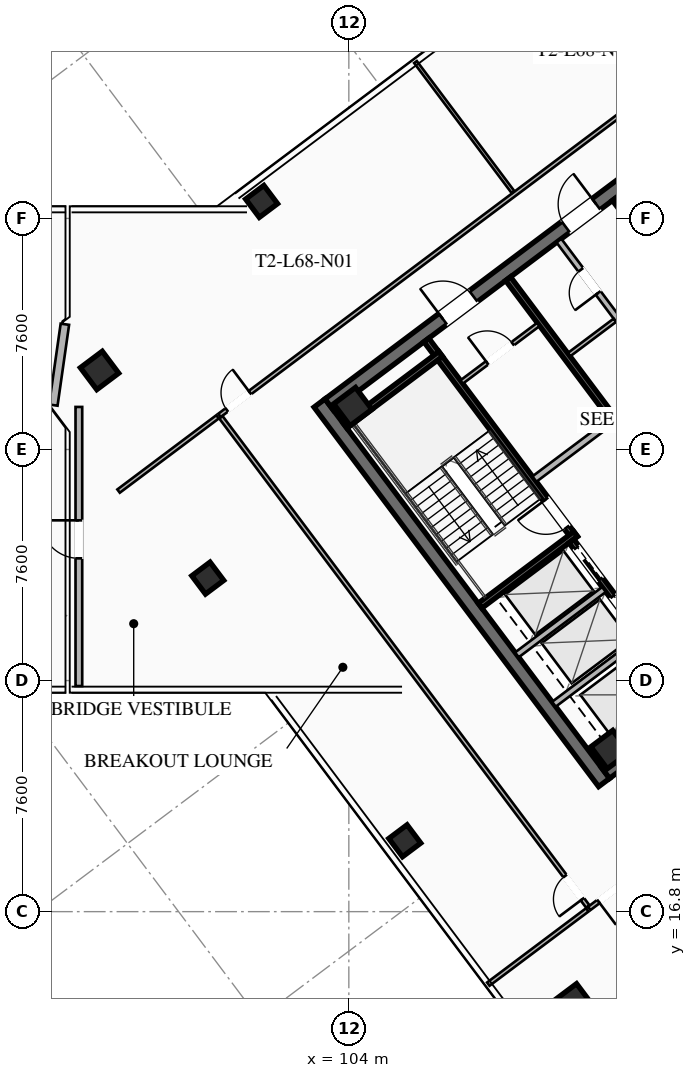
"""IFC4 building model, lengths in metres.
Left out: names, types, materials, properties, quantities, classifications, styles, units other than length and angle.
Written with IfcOpenShell. Run it as: python <this file> out.ifc"""

import sys

from ifc_helpers import new_model, si_unit, direction, frame, frame_2d, origin, origin_2d, place, context, subcontext, project, spatial, rectangle, hollow_rectangle, extrude, element, fill, save


model = new_model("IFC4")
c1 = context("Model", 3, precision=1e-05, world=origin(), true_north=direction((0.0, 1.0)))
c2 = subcontext(c1, "Body", "Model", "MODEL_VIEW")
j1 = project(units=[si_unit("LENGTHUNIT", "METRE"), si_unit("PLANEANGLEUNIT", "RADIAN")], contexts=[c1])
p1 = place(None, origin())
s1 = spatial("IfcSite", under=j1, at=p1, CompositionType="ELEMENT")
p2 = place(p1, origin())
s2 = spatial("IfcBuilding", under=s1, at=p2, CompositionType="ELEMENT")
p3 = place(p2, frame((0.0, 0.0, 251.4)))
s3 = spatial("IfcBuildingStorey", under=s2, at=p3, CompositionType="ELEMENT", Elevation=251.4)
p4 = place(p3, frame((112.396, 21.047, 0.0), z_axis=(0.0, 0.0, 1.0), x_axis=(-0.600005007985, 0.799996243986, 0.0)))
e1 = element("IfcWall", 1, at=p4, inside=s3, PredefinedType="SHEAR", context=c2, shape_type="SweptSolid", body=[
    extrude(rectangle(XDim=15.6, YDim=0.45, at=frame_2d((7.8, 0.0))), origin(), (0.0, 0.0, 1.0), 4.0),
])
p5 = place(p3, frame((124.649, 30.518, 0.0), z_axis=(0.0, 0.0, 1.0), x_axis=(-0.8, -0.6, 0.0)))
e2 = element("IfcWall", 2, at=p5, inside=s3, PredefinedType="SHEAR", context=c2, shape_type="SweptSolid", body=[
    extrude(rectangle(XDim=15.26, YDim=0.45, at=frame_2d((7.63, 0.0))), origin(), (0.0, 0.0, 1.0), 4.0),
])
p6 = place(p5, frame((9.33, 0.0, 0.0)))
e3 = element("IfcOpeningElement", 3, at=p6, cuts=e2, PredefinedType="OPENING", context=c2, shape_type="SweptSolid", body=[
    extrude(rectangle(XDim=1.25, YDim=2.25, at=frame_2d((0.625, 1.125))), frame((0.0, 0.235, 0.0), z_axis=(0.0, -1.0, 0.0), x_axis=(1.0, 0.0, 0.0)), (0.0, 0.0, 1.0), 0.47),
])
p7 = place(p5, frame((4.28, 0.0, 0.0)))
e4 = element("IfcOpeningElement", 4, at=p7, cuts=e2, PredefinedType="OPENING", context=c2, shape_type="SweptSolid", body=[
    extrude(rectangle(XDim=1.25, YDim=2.25, at=frame_2d((0.625, 1.125))), frame((0.0, 0.235, 0.0), z_axis=(0.0, -1.0, 0.0), x_axis=(1.0, 0.0, 0.0)), (0.0, 0.0, 1.0), 0.47),
])
p8 = place(p3, frame((103.351, 33.482, 0.0), z_axis=(0.0, 0.0, 1.0), x_axis=(0.8, 0.6, 0.0)))
e5 = element("IfcWall", 5, at=p8, inside=s3, PredefinedType="SHEAR", context=c2, shape_type="SweptSolid", body=[
    extrude(rectangle(XDim=15.26, YDim=0.45, at=frame_2d((7.63, 0.0))), origin(), (0.0, 0.0, 1.0), 4.0),
])
p9 = place(p8, frame((4.68, 0.0, 0.0)))
e6 = element("IfcOpeningElement", 6, at=p9, cuts=e5, PredefinedType="OPENING", context=c2, shape_type="SweptSolid", body=[
    extrude(rectangle(XDim=1.25, YDim=2.25, at=frame_2d((0.625, 1.125))), frame((0.0, 0.235, 0.0), z_axis=(0.0, -1.0, 0.0), x_axis=(1.0, 0.0, 0.0)), (0.0, 0.0, 1.0), 0.47),
])
p10 = place(p8, frame((9.73, 0.0, 0.0)))
e7 = element("IfcOpeningElement", 7, at=p10, cuts=e5, PredefinedType="OPENING", context=c2, shape_type="SweptSolid", body=[
    extrude(rectangle(XDim=1.25, YDim=2.25, at=frame_2d((0.625, 1.125))), frame((0.0, 0.235, 0.0), z_axis=(0.0, -1.0, 0.0), x_axis=(1.0, 0.0, 0.0)), (0.0, 0.0, 1.0), 0.47),
])
for number, where, z_axis, x_axis in (
    (8, (112.59, 22.13, 0.0), (0.0, 0.0, 1.0), (0.8, 0.6, 0.0)),
    (9, (104.13, 33.41, 0.0), (0.0, 0.0, 1.0), (0.8, 0.6, 0.0)),
    (10, (111.4, 13.8, 0.0), (0.0, 0.0, 1.0), (0.8, 0.6, 0.0)),
    (11, (95.8, 34.6, 0.0), (0.0, 0.0, 1.0), (0.8, 0.6, 0.0)),
):
    element("IfcColumn", number, at=place(p3, frame(where, z_axis=z_axis, x_axis=x_axis)), inside=s3, PredefinedType="COLUMN", context=c2, shape_type="SweptSolid", body=[
        extrude(hollow_rectangle(XDim=0.9, YDim=0.9, WallThickness=0.04, at=origin_2d()), origin(), (0.0, 0.0, 1.0), 3.78),
    ])
for number, where, z_axis, x_axis in (
    (12, (101.13, 40.16, 0.0), (0.0, 0.0, 1.0), (0.8, 0.6, 0.0)),
    (13, (99.36, 27.77, 0.0), (0.0, 0.0, 1.0), (0.8, 0.6, 0.0)),
    (14, (105.84, 19.13, 0.0), (0.0, 0.0, 1.0), (0.8, 0.6, 0.0)),
):
    element("IfcColumn", number, at=place(p3, frame(where, z_axis=z_axis, x_axis=x_axis)), inside=s3, PredefinedType="COLUMN", context=c2, shape_type="SweptSolid", body=[
        extrude(hollow_rectangle(XDim=0.75, YDim=0.75, WallThickness=0.032, at=origin_2d()), origin(), (0.0, 0.0, 1.0), 3.78),
    ])
p11 = place(p3, frame((94.28, 33.46, 0.0), z_axis=(0.0, 0.0, 1.0), x_axis=(0.141370477216, 0.989956760759, 0.0)))
e15 = element("IfcWall", 15, at=p11, inside=s3, PredefinedType="SOLIDWALL", context=c2, shape_type="SweptSolid", body=[
    extrude(rectangle(XDim=2.687, YDim=0.28, at=frame_2d((1.344, 0.0))), origin(), (0.0, 0.0, 1.0), 2.96),
])
p12 = place(p3, frame((95.12, 24.22, 0.0), z_axis=(0.0, 0.0, 1.0), x_axis=(0.0, 1.0, 0.0)))
e16 = element("IfcWall", 16, at=p12, inside=s3, PredefinedType="SOLIDWALL", context=c2, shape_type="SweptSolid", body=[
    extrude(rectangle(XDim=9.18, YDim=0.22, at=frame_2d((4.59, 0.0))), origin(), (0.0, 0.0, 1.0), 2.971),
])
p13 = place(p12, frame((4.2, 0.0, 0.0)))
e17 = element("IfcOpeningElement", 17, at=p13, cuts=e16, PredefinedType="OPENING", context=c2, shape_type="SweptSolid", body=[
    extrude(rectangle(XDim=1.25, YDim=2.25, at=frame_2d((0.625, 1.125))), frame((0.0, 0.12, 0.0), z_axis=(0.0, -1.0, 0.0), x_axis=(1.0, 0.0, 0.0)), (0.0, 0.0, 1.0), 0.24),
])
p14 = place(p3, frame((111.44, 29.08, 0.0), z_axis=(0.0, 0.0, 1.0), x_axis=(-0.59999041401, 0.800007189403, 0.0)))
e18 = element("IfcWall", 18, at=p14, inside=s3, PredefinedType="SHEAR", context=c2, shape_type="SweptSolid", body=[
    extrude(rectangle(XDim=8.15, YDim=0.2, at=frame_2d((4.075, 0.0))), origin(), (0.0, 0.0, 1.0), 3.78),
])
p15 = place(p14, frame((0.45, 0.0, 0.0)))
e19 = element("IfcOpeningElement", 19, at=p15, cuts=e18, PredefinedType="OPENING", context=c2, shape_type="SweptSolid", body=[
    extrude(rectangle(XDim=1.15, YDim=2.2, at=frame_2d((0.575, 1.1))), frame((0.0, 0.11, 0.0), z_axis=(0.0, -1.0, 0.0), x_axis=(1.0, 0.0, 0.0)), (0.0, 0.0, 1.0), 0.22),
])
for number, where, z_axis, x_axis in (
    (20, (108.316, 26.862, 0.0), (0.0, 0.0, 1.0), (0.8, 0.6, 0.0)),
    (21, (103.876, 32.782, 0.0), (0.0, 0.0, 1.0), (0.8, 0.6, 0.0)),
):
    element("IfcWall", number, at=place(p3, frame(where, z_axis=z_axis, x_axis=x_axis)), inside=s3, PredefinedType="SHEAR", context=c2, shape_type="SweptSolid", body=[
        extrude(rectangle(XDim=3.93, YDim=0.2, at=frame_2d((1.965, 0.0))), origin(), (0.0, 0.0, 1.0), 3.78),
    ])
p16 = place(p3, frame((118.058, 25.856, 0.0), z_axis=(0.0, 0.0, 1.0), x_axis=(-0.600002657301, 0.799998007018, 0.0)))
e22 = element("IfcWall", 22, at=p16, inside=s3, PredefinedType="SHEAR", context=c2, shape_type="SweptSolid", body=[
    extrude(rectangle(XDim=14.7, YDim=0.2, at=frame_2d((7.35, 0.0))), origin(), (0.0, 0.0, 1.0), 3.78),
])
p17 = place(p3, frame((110.104, 31.028, 0.0), z_axis=(0.0, 0.0, 1.0), x_axis=(0.800018601094, 0.59997519774, 0.0)))
e23 = element("IfcWall", 23, at=p17, inside=s3, PredefinedType="SOLIDWALL", context=c2, shape_type="SweptSolid", body=[
    extrude(rectangle(XDim=3.15, YDim=0.22, at=frame_2d((1.575, 0.0))), origin(), (0.0, 0.0, 1.0), 2.971),
])
p18 = place(p3, frame((115.25, 23.75, 0.0), z_axis=(0.0, 0.0, 1.0), x_axis=(-0.599994036198, 0.800004472816, 0.0)))
e24 = element("IfcWall", 24, at=p18, inside=s3, PredefinedType="SHEAR", context=c2, shape_type="SweptSolid", body=[
    extrude(rectangle(XDim=6.55, YDim=0.2, at=frame_2d((3.275, 0.0))), origin(), (0.0, 0.0, 1.0), 3.78),
])
p19 = place(p18, frame((4.975, 0.0, 0.0)))
e25 = element("IfcOpeningElement", 25, at=p19, cuts=e24, PredefinedType="OPENING", context=c2, shape_type="SweptSolid", body=[
    extrude(rectangle(XDim=1.3, YDim=2.25, at=frame_2d((0.65, 1.125))), frame((0.0, 0.11, 0.0), z_axis=(0.0, -1.0, 0.0), x_axis=(1.0, 0.0, 0.0)), (0.0, 0.0, 1.0), 0.22),
])
p20 = place(p18, frame((2.975, 0.0, 0.0)))
e26 = element("IfcOpeningElement", 26, at=p20, cuts=e24, PredefinedType="OPENING", context=c2, shape_type="SweptSolid", body=[
    extrude(rectangle(XDim=1.3, YDim=2.25, at=frame_2d((0.65, 1.125))), frame((0.0, 0.11, 0.0), z_axis=(0.0, -1.0, 0.0), x_axis=(1.0, 0.0, 0.0)), (0.0, 0.0, 1.0), 0.22),
])
p21 = place(p18, frame((0.775, 0.0, 0.0)))
e27 = element("IfcOpeningElement", 27, at=p21, cuts=e24, PredefinedType="OPENING", context=c2, shape_type="SweptSolid", body=[
    extrude(rectangle(XDim=1.3, YDim=2.25, at=frame_2d((0.65, 1.125))), frame((0.0, 0.11, 0.0), z_axis=(0.0, -1.0, 0.0), x_axis=(1.0, 0.0, 0.0)), (0.0, 0.0, 1.0), 0.22),
])
for number, where, z_axis, x_axis in (
    (28, (110.746, 23.622, 0.0), (0.0, 0.0, 1.0), (0.8, 0.6, 0.0)),
    (29, (109.528, 25.246, 0.0), (0.0, 0.0, 1.0), (0.8, 0.6, 0.0)),
):
    element("IfcWall", number, at=place(p3, frame(where, z_axis=z_axis, x_axis=x_axis)), inside=s3, PredefinedType="SOLIDWALL", context=c2, shape_type="SweptSolid", body=[
        extrude(rectangle(XDim=3.58, YDim=0.2, at=frame_2d((1.79, 0.0))), origin(), (0.0, 0.0, 1.0), 3.78),
    ])
p22 = place(p3, frame((112.75, 40.25, 0.0), z_axis=(0.0, 0.0, 1.0), x_axis=(0.599994036198, -0.800004472816, 0.0)))
e30 = element("IfcWall", 30, at=p22, inside=s3, PredefinedType="SHEAR", context=c2, shape_type="SweptSolid", body=[
    extrude(rectangle(XDim=6.55, YDim=0.2, at=frame_2d((3.275, 0.0))), origin(), (0.0, 0.0, 1.0), 3.78),
])
p23 = place(p22, frame((5.075, 0.0, 0.0)))
e31 = element("IfcOpeningElement", 31, at=p23, cuts=e30, PredefinedType="OPENING", context=c2, shape_type="SweptSolid", body=[
    extrude(rectangle(XDim=1.1, YDim=2.2, at=frame_2d((0.55, 1.1))), frame((0.0, 0.11, 0.0), z_axis=(0.0, -1.0, 0.0), x_axis=(1.0, 0.0, 0.0)), (0.0, 0.0, 1.0), 0.22),
])
p24 = place(p22, frame((3.025, 0.0, 0.0)))
e32 = element("IfcOpeningElement", 32, at=p24, cuts=e30, PredefinedType="OPENING", context=c2, shape_type="SweptSolid", body=[
    extrude(rectangle(XDim=1.1, YDim=2.2, at=frame_2d((0.55, 1.1))), frame((0.0, 0.11, 0.0), z_axis=(0.0, -1.0, 0.0), x_axis=(1.0, 0.0, 0.0)), (0.0, 0.0, 1.0), 0.22),
])
p25 = place(p22, frame((1.025, 0.0, 0.0)))
e33 = element("IfcOpeningElement", 33, at=p25, cuts=e30, PredefinedType="OPENING", context=c2, shape_type="SweptSolid", body=[
    extrude(rectangle(XDim=1.1, YDim=2.2, at=frame_2d((0.55, 1.1))), frame((0.0, 0.11, 0.0), z_axis=(0.0, -1.0, 0.0), x_axis=(1.0, 0.0, 0.0)), (0.0, 0.0, 1.0), 0.22),
])
p26 = place(p3, frame((107.71, 34.22, 0.0), z_axis=(0.0, 0.0, 1.0), x_axis=(0.799981399002, 0.60002480053, 0.0)))
e34 = element("IfcWall", 34, at=p26, inside=s3, PredefinedType="PARTITIONING", context=c2, shape_type="SweptSolid", body=[
    extrude(rectangle(XDim=3.15, YDim=0.135, at=frame_2d((1.575, 0.0))), origin(), (0.0, 0.0, 1.0), 2.971),
])
p27 = place(p26, frame((1.05, 0.0, 0.0)))
e35 = element("IfcOpeningElement", 35, at=p27, cuts=e34, PredefinedType="OPENING", context=c2, shape_type="SweptSolid", body=[
    extrude(rectangle(XDim=1.05, YDim=2.2, at=frame_2d((0.525, 1.1))), frame((0.0, 0.077, 0.0), z_axis=(0.0, -1.0, 0.0), x_axis=(1.0, 0.0, 0.0)), (0.0, 0.0, 1.0), 0.155),
])
p28 = place(p3, frame((115.11, 33.27, 0.0), z_axis=(0.0, 0.0, 1.0), x_axis=(-0.600011160345, 0.79999162962, 0.0)))
e36 = element("IfcWall", 36, at=p28, inside=s3, PredefinedType="SOLIDWALL", context=c2, shape_type="SweptSolid", body=[
    extrude(rectangle(XDim=7.0, YDim=0.2, at=frame_2d((3.5, 0.0))), origin(), (0.0, 0.0, 1.0), 2.971),
])
p29 = place(p28, frame((0.85, 0.0, 0.0)))
e37 = element("IfcOpeningElement", 37, at=p29, cuts=e36, PredefinedType="OPENING", context=c2, shape_type="SweptSolid", body=[
    extrude(rectangle(XDim=0.95, YDim=2.05, at=frame_2d((0.475, 1.025))), frame((0.0, 0.11, 0.0), z_axis=(0.0, -1.0, 0.0), x_axis=(1.0, 0.0, 0.0)), (0.0, 0.0, 1.0), 0.22),
])
p30 = place(p28, frame((4.85, 0.0, 0.0)))
e38 = element("IfcOpeningElement", 38, at=p30, cuts=e36, PredefinedType="OPENING", context=c2, shape_type="SweptSolid", body=[
    extrude(rectangle(XDim=0.95, YDim=2.05, at=frame_2d((0.475, 1.025))), frame((0.0, 0.11, 0.0), z_axis=(0.0, -1.0, 0.0), x_axis=(1.0, 0.0, 0.0)), (0.0, 0.0, 1.0), 0.22),
])
p31 = place(p3, frame((111.246, 35.122, 0.0), z_axis=(0.0, 0.0, 1.0), x_axis=(0.8, 0.6, 0.0)))
e39 = element("IfcWall", 39, at=p31, inside=s3, PredefinedType="PARTITIONING", context=c2, shape_type="SweptSolid", body=[
    extrude(rectangle(XDim=1.88, YDim=0.135, at=frame_2d((0.94, 0.0))), origin(), (0.0, 0.0, 1.0), 2.971),
])
p32 = place(p3, frame((99.746, 33.122, 0.0), z_axis=(0.0, 0.0, 1.0), x_axis=(0.800001242445, 0.599998343403, 0.0)))
e40 = element("IfcWall", 40, at=p32, inside=s3, PredefinedType="PARTITIONING", context=c2, shape_type="SweptSolid", body=[
    extrude(rectangle(XDim=23.58, YDim=0.135, at=frame_2d((11.79, 0.0))), origin(), (0.0, 0.0, 1.0), 2.971),
])
p33 = place(p32, frame((0.3, 0.0, 0.0)))
e41 = element("IfcOpeningElement", 41, at=p33, cuts=e40, PredefinedType="OPENING", context=c2, shape_type="SweptSolid", body=[
    extrude(rectangle(XDim=0.95, YDim=2.05, at=frame_2d((0.475, 1.025))), frame((0.0, 0.077, 0.0), z_axis=(0.0, -1.0, 0.0), x_axis=(1.0, 0.0, 0.0)), (0.0, 0.0, 1.0), 0.155),
])
p34 = place(p32, frame((22.33, 0.0, 0.0)))
e42 = element("IfcOpeningElement", 42, at=p34, cuts=e40, PredefinedType="OPENING", context=c2, shape_type="SweptSolid", body=[
    extrude(rectangle(XDim=0.95, YDim=2.05, at=frame_2d((0.475, 1.025))), frame((0.0, 0.077, 0.0), z_axis=(0.0, -1.0, 0.0), x_axis=(1.0, 0.0, 0.0)), (0.0, 0.0, 1.0), 0.155),
])
p35 = place(p3, frame((109.402, 40.464, 0.0), z_axis=(0.0, 0.0, 1.0), x_axis=(-0.600043807911, 0.799967142192, 0.0)))
e43 = element("IfcWall", 43, at=p35, inside=s3, PredefinedType="PARTITIONING", context=c2, shape_type="SweptSolid", body=[
    extrude(rectangle(XDim=5.35, YDim=0.11, at=frame_2d((2.675, 0.0))), origin(), (0.0, 0.0, 1.0), 2.971),
])
p36 = place(p3, frame((124.012, 25.984, 0.0), z_axis=(0.0, 0.0, 1.0), x_axis=(-0.800003872688, -0.599994836382, 0.0)))
e44 = element("IfcWall", 44, at=p36, inside=s3, PredefinedType="PARTITIONING", context=c2, shape_type="SweptSolid", body=[
    extrude(rectangle(XDim=15.13, YDim=0.135, at=frame_2d((7.565, 0.0))), origin(), (0.0, 0.0, 1.0), 2.971),
])
p37 = place(p36, frame((13.8, 0.0, 0.0)))
e45 = element("IfcOpeningElement", 45, at=p37, cuts=e44, PredefinedType="OPENING", context=c2, shape_type="SweptSolid", body=[
    extrude(rectangle(XDim=0.95, YDim=2.05, at=frame_2d((0.475, 1.025))), frame((0.0, 0.077, 0.0), z_axis=(0.0, -1.0, 0.0), x_axis=(1.0, 0.0, 0.0)), (0.0, 0.0, 1.0), 0.155),
])
p38 = place(p36, frame((3.663, 0.0, 0.0)))
e46 = element("IfcOpeningElement", 46, at=p38, cuts=e44, PredefinedType="OPENING", context=c2, shape_type="SweptSolid", body=[
    extrude(rectangle(XDim=0.95, YDim=2.05, at=frame_2d((0.475, 1.025))), frame((0.0, 0.077, 0.0), z_axis=(0.0, -1.0, 0.0), x_axis=(1.0, 0.0, 0.0)), (0.0, 0.0, 1.0), 0.155),
])
p39 = place(p3, frame((111.86, 16.97, 0.0), z_axis=(0.0, 0.0, 1.0), x_axis=(-0.60000194242, 0.799998543181, 0.0)))
e47 = element("IfcWall", 47, at=p39, inside=s3, PredefinedType="PARTITIONING", context=c2, shape_type="SweptSolid", body=[
    extrude(rectangle(XDim=20.11, YDim=0.135, at=frame_2d((10.055, 0.0))), origin(), (0.0, 0.0, 1.0), 2.971),
])
p40 = place(p39, frame((0.3, 0.0, 0.0)))
e48 = element("IfcOpeningElement", 48, at=p40, cuts=e47, PredefinedType="OPENING", context=c2, shape_type="SweptSolid", body=[
    extrude(rectangle(XDim=0.95, YDim=2.05, at=frame_2d((0.475, 1.025))), frame((0.0, 0.077, 0.0), z_axis=(0.0, -1.0, 0.0), x_axis=(1.0, 0.0, 0.0)), (0.0, 0.0, 1.0), 0.155),
])
p41 = place(p3, frame((99.682, 33.074, 0.0), z_axis=(0.0, 0.0, 1.0), x_axis=(-0.8, -0.6, 0.0)))
e49 = element("IfcWall", 49, at=p41, inside=s3, PredefinedType="PARTITIONING", context=c2, shape_type="SweptSolid", body=[
    extrude(rectangle(XDim=4.07, YDim=0.135, at=frame_2d((2.035, 0.0))), origin(), (0.0, 0.0, 1.0), 2.971),
])
p42 = place(p3, frame((108.588, 14.416, 0.0), z_axis=(0.0, 0.0, 1.0), x_axis=(0.800021594126, 0.599971206752, 0.0)))
e50 = element("IfcWall", 50, at=p42, inside=s3, PredefinedType="PARTITIONING", context=c2, shape_type="SweptSolid", body=[
    extrude(rectangle(XDim=4.07, YDim=0.135, at=frame_2d((2.035, 0.0))), origin(), (0.0, 0.0, 1.0), 2.971),
])
p43 = place(p13, origin())
e51 = element("IfcDoor", 51, at=p43, inside=s3, OperationType="SINGLE_SWING_RIGHT", PredefinedType="DOOR", context=c2, shape_type="SweptSolid", body=[
    extrude(rectangle(XDim=1.25, YDim=2.25, at=frame_2d((0.625, 1.125))), frame((0.0, 0.025, 0.0), z_axis=(0.0, -1.0, 0.0), x_axis=(1.0, 0.0, 0.0)), (0.0, 0.0, 1.0), 0.05),
])
fill(e17, e51)
p44 = place(p9, origin())
e52 = element("IfcDoor", 52, at=p44, inside=s3, OperationType="SINGLE_SWING_LEFT", PredefinedType="DOOR", context=c2, shape_type="SweptSolid", body=[
    extrude(rectangle(XDim=1.25, YDim=2.25, at=frame_2d((0.625, 1.125))), frame((0.0, 0.025, 0.0), z_axis=(0.0, -1.0, 0.0), x_axis=(1.0, 0.0, 0.0)), (0.0, 0.0, 1.0), 0.05),
])
fill(e6, e52)
p45 = place(p10, origin())
e53 = element("IfcDoor", 53, at=p45, inside=s3, OperationType="SINGLE_SWING_RIGHT", PredefinedType="DOOR", context=c2, shape_type="SweptSolid", body=[
    extrude(rectangle(XDim=1.25, YDim=2.25, at=frame_2d((0.625, 1.125))), frame((0.0, 0.025, 0.0), z_axis=(0.0, -1.0, 0.0), x_axis=(1.0, 0.0, 0.0)), (0.0, 0.0, 1.0), 0.05),
])
fill(e7, e53)
p46 = place(p15, origin())
e54 = element("IfcDoor", 54, at=p46, inside=s3, OperationType="SINGLE_SWING_RIGHT", PredefinedType="DOOR", context=c2, shape_type="SweptSolid", body=[
    extrude(rectangle(XDim=1.15, YDim=2.2, at=frame_2d((0.575, 1.1))), frame((0.0, 0.025, 0.0), z_axis=(0.0, -1.0, 0.0), x_axis=(1.0, 0.0, 0.0)), (0.0, 0.0, 1.0), 0.05),
])
fill(e19, e54)
p47 = place(p27, origin())
e55 = element("IfcDoor", 55, at=p47, inside=s3, OperationType="SINGLE_SWING_LEFT", PredefinedType="DOOR", context=c2, shape_type="SweptSolid", body=[
    extrude(rectangle(XDim=1.05, YDim=2.2, at=frame_2d((0.525, 1.1))), frame((0.0, 0.025, 0.0), z_axis=(0.0, -1.0, 0.0), x_axis=(1.0, 0.0, 0.0)), (0.0, 0.0, 1.0), 0.05),
])
fill(e35, e55)
p48 = place(p30, origin())
e56 = element("IfcDoor", 56, at=p48, inside=s3, OperationType="SINGLE_SWING_LEFT", PredefinedType="DOOR", context=c2, shape_type="SweptSolid", body=[
    extrude(rectangle(XDim=0.95, YDim=2.05, at=frame_2d((0.475, 1.025))), frame((0.0, 0.025, 0.0), z_axis=(0.0, -1.0, 0.0), x_axis=(1.0, 0.0, 0.0)), (0.0, 0.0, 1.0), 0.05),
])
fill(e38, e56)
p49 = place(p33, origin())
e57 = element("IfcDoor", 57, at=p49, inside=s3, OperationType="SINGLE_SWING_RIGHT", PredefinedType="DOOR", context=c2, shape_type="SweptSolid", body=[
    extrude(rectangle(XDim=0.95, YDim=2.05, at=frame_2d((0.475, 1.025))), frame((0.0, 0.025, 0.0), z_axis=(0.0, -1.0, 0.0), x_axis=(1.0, 0.0, 0.0)), (0.0, 0.0, 1.0), 0.05),
])
fill(e41, e57)
p50 = place(p37, origin())
e58 = element("IfcDoor", 58, at=p50, inside=s3, OperationType="SINGLE_SWING_RIGHT", PredefinedType="DOOR", context=c2, shape_type="SweptSolid", body=[
    extrude(rectangle(XDim=0.95, YDim=2.05, at=frame_2d((0.475, 1.025))), frame((0.0, 0.025, 0.0), z_axis=(0.0, -1.0, 0.0), x_axis=(1.0, 0.0, 0.0)), (0.0, 0.0, 1.0), 0.05),
])
fill(e45, e58)
p51 = place(p40, origin())
e59 = element("IfcDoor", 59, at=p51, inside=s3, OperationType="SINGLE_SWING_LEFT", PredefinedType="DOOR", context=c2, shape_type="SweptSolid", body=[
    extrude(rectangle(XDim=0.95, YDim=2.05, at=frame_2d((0.475, 1.025))), frame((0.0, 0.025, 0.0), z_axis=(0.0, -1.0, 0.0), x_axis=(1.0, 0.0, 0.0)), (0.0, 0.0, 1.0), 0.05),
])
fill(e48, e59)
p52 = place(p19, origin())
e60 = element("IfcDoor", 60, at=p52, inside=s3, OperationType="SLIDING_TO_LEFT", PredefinedType="DOOR", context=c2, shape_type="SweptSolid", body=[
    extrude(rectangle(XDim=1.3, YDim=2.25, at=frame_2d((0.65, 1.125))), frame((0.0, 0.025, 0.0), z_axis=(0.0, -1.0, 0.0), x_axis=(1.0, 0.0, 0.0)), (0.0, 0.0, 1.0), 0.05),
])
fill(e25, e60)
p53 = place(p20, origin())
e61 = element("IfcDoor", 61, at=p53, inside=s3, OperationType="SLIDING_TO_LEFT", PredefinedType="DOOR", context=c2, shape_type="SweptSolid", body=[
    extrude(rectangle(XDim=1.3, YDim=2.25, at=frame_2d((0.65, 1.125))), frame((0.0, 0.025, 0.0), z_axis=(0.0, -1.0, 0.0), x_axis=(1.0, 0.0, 0.0)), (0.0, 0.0, 1.0), 0.05),
])
fill(e26, e61)
save(model, sys.argv[1])
